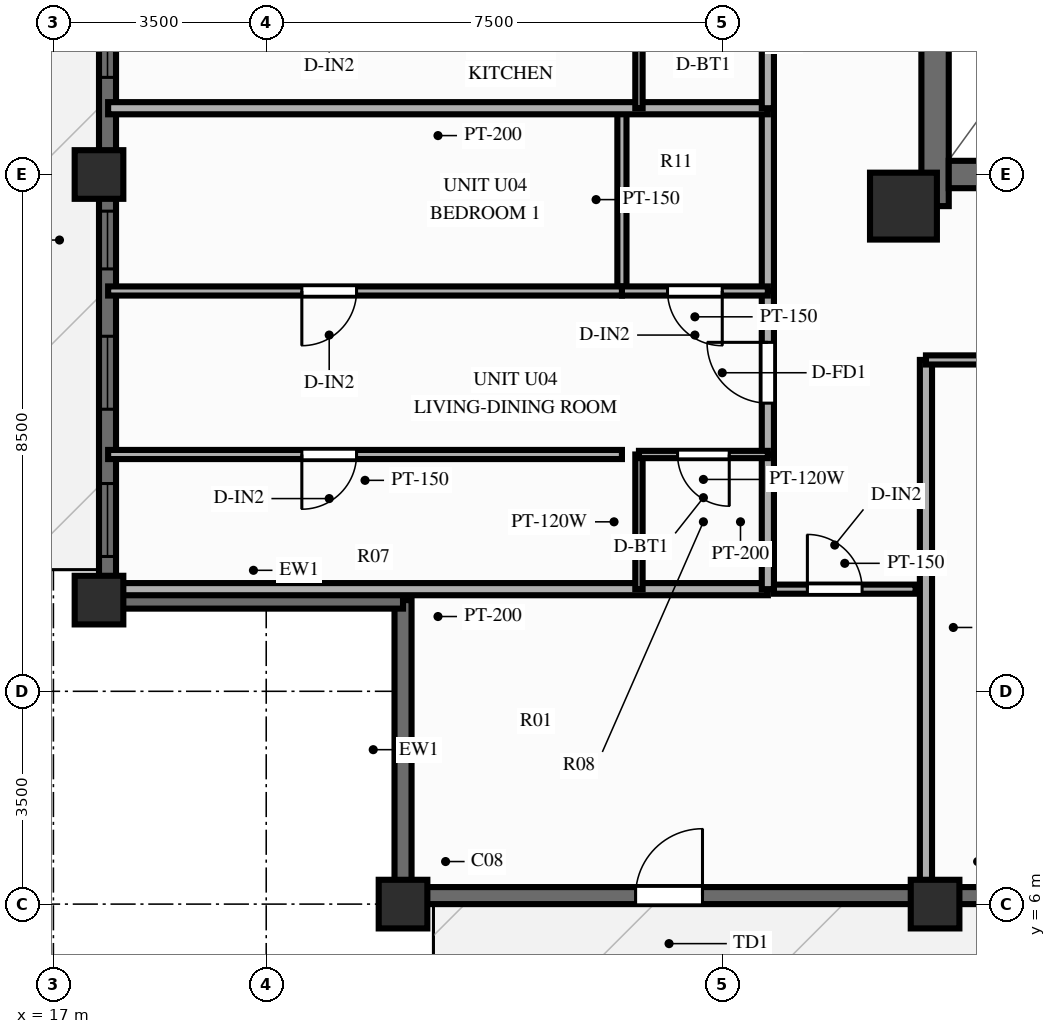
"""IFC4 building model, lengths in metres.
Left out: names, types, materials, properties, quantities, classifications, styles, units other than length and angle.
Written with IfcOpenShell. Run it as: python <this file> out.ifc"""

import sys

from ifc_helpers import new_model, si_unit, direction, frame, frame_2d, origin, origin_2d, place, context, subcontext, project, spatial, rectangle, extrude, source, transform, mapped, element, fill, save


model = new_model("IFC4")
c1 = context("Model", 3, precision=1e-05, world=origin(), true_north=direction((0.0, 1.0)))
c2 = subcontext(c1, "Body", "Model", "MODEL_VIEW")
j1 = project(units=[si_unit("LENGTHUNIT", "METRE"), si_unit("PLANEANGLEUNIT", "RADIAN")], contexts=[c1])
p1 = place(None, origin())
s1 = spatial("IfcSite", under=j1, at=p1, CompositionType="ELEMENT")
p2 = place(p1, origin())
s2 = spatial("IfcBuilding", under=s1, at=p2, CompositionType="ELEMENT")
p3 = place(p2, frame((0.0, 0.0, 192.7)))
s3 = spatial("IfcBuildingStorey", under=s2, at=p3, CompositionType="ELEMENT", Elevation=192.7)
p4 = place(p3, frame((31.5, 17.48, 0.0), z_axis=(0.0, 0.0, 1.0), x_axis=(0.0, 1.0, 0.0)))
e1 = element("IfcWall", 1, at=p4, inside=s3, PredefinedType="SHEAR", context=c2, shape_type="SweptSolid", body=[
    extrude(rectangle(XDim=19.04, YDim=0.45, at=frame_2d((9.52, 0.0))), origin(), (0.0, 0.0, 1.0), 3.9),
])
p5 = place(p4, frame((6.32, 0.0, 0.0)))
e2 = element("IfcOpeningElement", 2, at=p5, cuts=e1, PredefinedType="OPENING", context=c2, shape_type="SweptSolid", body=[
    extrude(rectangle(XDim=1.1, YDim=2.15, at=frame_2d((0.55, 1.075))), frame((0.0, 0.237, 0.0), z_axis=(0.0, -1.0, 0.0), x_axis=(1.0, 0.0, 0.0)), (0.0, 0.0, 1.0), 0.474),
])
p6 = place(p3, frame((31.725, 18.0, 0.0), z_axis=(0.0, 0.0, 1.0), x_axis=(1.0, 0.0, 0.0)))
e3 = element("IfcWall", 3, at=p6, inside=s3, PredefinedType="SHEAR", context=c2, shape_type="SweptSolid", body=[
    extrude(rectangle(XDim=12.55, YDim=0.45, at=frame_2d((6.275, 0.0))), origin(), (0.0, 0.0, 1.0), 3.9),
])
m1 = source(origin(), c2, "Body", "SweptSolid", [
    extrude(rectangle(XDim=1.1, YDim=1.1, at=origin_2d()), origin(), (0.0, 0.0, 1.0), 3.9),
])
p7 = place(p3, frame((30.98, 17.48, 0.0), z_axis=(0.0, 0.0, 1.0), x_axis=(1.0, 0.0, 0.0)))
e4 = element("IfcColumn", 4, at=p7, inside=s3, PredefinedType="COLUMN", context=c2, shape_type="MappedRepresentation", body=[
    mapped(m1, transform((0.0, 0.0, 0.0), scale=1.0)),
])
m2 = source(origin(), c2, "Body", "SweptSolid", [
    extrude(rectangle(XDim=0.8, YDim=0.8, at=origin_2d()), origin(), (0.0, 0.0, 1.0), 3.9),
])
for number, where, z_axis, x_axis in (
    (5, (22.75, 6.0, 0.0), (0.0, 0.0, 1.0), (1.0, 0.0, 0.0)),
    (6, (31.5, 6.0, 0.0), (0.0, 0.0, 1.0), (1.0, 0.0, 0.0)),
    (7, (17.75, 18.0, 0.0), (0.0, 0.0, 1.0), (1.0, 0.0, 0.0)),
    (8, (17.75, 11.0, 0.0), (0.0, 0.0, 1.0), (1.0, 0.0, 0.0)),
):
    element("IfcColumn", number, at=place(p3, frame(where, z_axis=z_axis, x_axis=x_axis)), inside=s3, PredefinedType="COLUMN", context=c2, shape_type="MappedRepresentation", body=[
        mapped(m2, transform((0.0, 0.0, 0.0), scale=1.0)),
    ])
p8 = place(p3, frame((22.75, 6.14, 0.0), z_axis=(0.0, 0.0, 1.0), x_axis=(1.0, 0.0, 0.0)))
e9 = element("IfcWall", 9, at=p8, inside=s3, PredefinedType="SOLIDWALL", context=c2, shape_type="SweptSolid", body=[
    extrude(rectangle(XDim=30.5, YDim=0.28, at=frame_2d((15.25, 0.0))), origin(), (0.0, 0.0, 1.0), 2.44),
])
p9 = place(p8, frame((4.925, 0.0, 0.0), z_axis=(0.0, 0.0, 1.0), x_axis=(-1.0, 0.0, 0.0)))
e10 = element("IfcOpeningElement", 10, at=p9, cuts=e9, PredefinedType="OPENING", context=c2, shape_type="SweptSolid", body=[
    extrude(rectangle(XDim=1.1, YDim=2.15, at=frame_2d((0.55, 1.075))), frame((0.0, 0.152, 0.0), z_axis=(0.0, -1.0, 0.0), x_axis=(1.0, 0.0, 0.0)), (0.0, 0.0, 1.0), 0.304),
])
p10 = place(p8, frame((11.387, 0.0, 0.25)))
e11 = element("IfcOpeningElement", 11, at=p10, cuts=e9, PredefinedType="OPENING", context=c2, shape_type="SweptSolid", body=[
    extrude(rectangle(XDim=1.2, YDim=1.5, at=frame_2d((0.6, 0.75))), frame((0.0, 0.152, 0.0), z_axis=(0.0, -1.0, 0.0), x_axis=(1.0, 0.0, 0.0)), (0.0, 0.0, 1.0), 0.304),
])
p11 = place(p8, frame((15.484, 0.0, 0.25)))
e12 = element("IfcOpeningElement", 12, at=p11, cuts=e9, PredefinedType="OPENING", context=c2, shape_type="SweptSolid", body=[
    extrude(rectangle(XDim=1.2, YDim=1.5, at=frame_2d((0.6, 0.75))), frame((0.0, 0.152, 0.0), z_axis=(0.0, -1.0, 0.0), x_axis=(1.0, 0.0, 0.0)), (0.0, 0.0, 1.0), 0.304),
])
p12 = place(p8, frame((17.628, 0.0, 0.25)))
e13 = element("IfcOpeningElement", 13, at=p12, cuts=e9, PredefinedType="OPENING", context=c2, shape_type="SweptSolid", body=[
    extrude(rectangle(XDim=1.2, YDim=1.5, at=frame_2d((0.6, 0.75))), frame((0.0, 0.152, 0.0), z_axis=(0.0, -1.0, 0.0), x_axis=(1.0, 0.0, 0.0)), (0.0, 0.0, 1.0), 0.304),
])
p13 = place(p8, frame((19.791, 0.0, 0.25)))
e14 = element("IfcOpeningElement", 14, at=p13, cuts=e9, PredefinedType="OPENING", context=c2, shape_type="SweptSolid", body=[
    extrude(rectangle(XDim=1.2, YDim=1.5, at=frame_2d((0.6, 0.75))), frame((0.0, 0.152, 0.0), z_axis=(0.0, -1.0, 0.0), x_axis=(1.0, 0.0, 0.0)), (0.0, 0.0, 1.0), 0.304),
])
p14 = place(p8, frame((25.525, 0.0, 0.25)))
e15 = element("IfcOpeningElement", 15, at=p14, cuts=e9, PredefinedType="OPENING", context=c2, shape_type="SweptSolid", body=[
    extrude(rectangle(XDim=1.2, YDim=1.5, at=frame_2d((0.6, 0.75))), frame((0.0, 0.152, 0.0), z_axis=(0.0, -1.0, 0.0), x_axis=(1.0, 0.0, 0.0)), (0.0, 0.0, 1.0), 0.304),
])
p15 = place(p3, frame((17.89, 11.0, 0.0), z_axis=(0.0, 0.0, 1.0), x_axis=(0.0, 1.0, 0.0)))
e16 = element("IfcWall", 16, at=p15, inside=s3, PredefinedType="SOLIDWALL", context=c2, shape_type="SweptSolid", body=[
    extrude(rectangle(XDim=32.0, YDim=0.28, at=frame_2d((16.0, 0.0))), origin(), (0.0, 0.0, 1.0), 2.44),
])
p16 = place(p15, frame((0.717, 0.0, 0.25)))
e17 = element("IfcOpeningElement", 17, at=p16, cuts=e16, PredefinedType="OPENING", context=c2, shape_type="SweptSolid", body=[
    extrude(rectangle(XDim=1.2, YDim=1.5, at=frame_2d((0.6, 0.75))), frame((0.0, 0.152, 0.0), z_axis=(0.0, -1.0, 0.0), x_axis=(1.0, 0.0, 0.0)), (0.0, 0.0, 1.0), 0.304),
])
p17 = place(p15, frame((3.139, 0.0, 0.25)))
e18 = element("IfcOpeningElement", 18, at=p17, cuts=e16, PredefinedType="OPENING", context=c2, shape_type="SweptSolid", body=[
    extrude(rectangle(XDim=1.2, YDim=1.5, at=frame_2d((0.6, 0.75))), frame((0.0, 0.152, 0.0), z_axis=(0.0, -1.0, 0.0), x_axis=(1.0, 0.0, 0.0)), (0.0, 0.0, 1.0), 0.304),
])
p18 = place(p15, frame((5.447, 0.0, 0.25)))
e19 = element("IfcOpeningElement", 19, at=p18, cuts=e16, PredefinedType="OPENING", context=c2, shape_type="SweptSolid", body=[
    extrude(rectangle(XDim=0.95, YDim=1.5, at=frame_2d((0.475, 0.75))), frame((0.0, 0.152, 0.0), z_axis=(0.0, -1.0, 0.0), x_axis=(1.0, 0.0, 0.0)), (0.0, 0.0, 1.0), 0.304),
])
p19 = place(p15, frame((8.597, 0.0, 0.25)))
e20 = element("IfcOpeningElement", 20, at=p19, cuts=e16, PredefinedType="OPENING", context=c2, shape_type="SweptSolid", body=[
    extrude(rectangle(XDim=1.2, YDim=1.5, at=frame_2d((0.6, 0.75))), frame((0.0, 0.152, 0.0), z_axis=(0.0, -1.0, 0.0), x_axis=(1.0, 0.0, 0.0)), (0.0, 0.0, 1.0), 0.304),
])
p20 = place(p15, frame((11.05, 0.0, 0.25)))
e21 = element("IfcOpeningElement", 21, at=p20, cuts=e16, PredefinedType="OPENING", context=c2, shape_type="SweptSolid", body=[
    extrude(rectangle(XDim=1.2, YDim=1.5, at=frame_2d((0.6, 0.75))), frame((0.0, 0.152, 0.0), z_axis=(0.0, -1.0, 0.0), x_axis=(1.0, 0.0, 0.0)), (0.0, 0.0, 1.0), 0.304),
])
p21 = place(p15, frame((13.697, 0.0, 0.0)))
e22 = element("IfcOpeningElement", 22, at=p21, cuts=e16, PredefinedType="OPENING", context=c2, shape_type="SweptSolid", body=[
    extrude(rectangle(XDim=1.6, YDim=2.15, at=frame_2d((0.8, 1.075))), frame((0.0, 0.152, 0.0), z_axis=(0.0, -1.0, 0.0), x_axis=(1.0, 0.0, 0.0)), (0.0, 0.0, 1.0), 0.304),
])
p22 = place(p15, frame((16.507, 0.0, 0.25)))
e23 = element("IfcOpeningElement", 23, at=p22, cuts=e16, PredefinedType="OPENING", context=c2, shape_type="SweptSolid", body=[
    extrude(rectangle(XDim=1.2, YDim=1.5, at=frame_2d((0.6, 0.75))), frame((0.0, 0.152, 0.0), z_axis=(0.0, -1.0, 0.0), x_axis=(1.0, 0.0, 0.0)), (0.0, 0.0, 1.0), 0.304),
])
p23 = place(p15, frame((18.959, 0.0, 0.25)))
e24 = element("IfcOpeningElement", 24, at=p23, cuts=e16, PredefinedType="OPENING", context=c2, shape_type="SweptSolid", body=[
    extrude(rectangle(XDim=1.2, YDim=1.5, at=frame_2d((0.6, 0.75))), frame((0.0, 0.152, 0.0), z_axis=(0.0, -1.0, 0.0), x_axis=(1.0, 0.0, 0.0)), (0.0, 0.0, 1.0), 0.304),
])
p24 = place(p15, frame((21.807, 0.0, 0.25)))
e25 = element("IfcOpeningElement", 25, at=p24, cuts=e16, PredefinedType="OPENING", context=c2, shape_type="SweptSolid", body=[
    extrude(rectangle(XDim=1.2, YDim=1.5, at=frame_2d((0.6, 0.75))), frame((0.0, 0.152, 0.0), z_axis=(0.0, -1.0, 0.0), x_axis=(1.0, 0.0, 0.0)), (0.0, 0.0, 1.0), 0.304),
])
p25 = place(p15, frame((26.967, 0.0, 0.25)))
e26 = element("IfcOpeningElement", 26, at=p25, cuts=e16, PredefinedType="OPENING", context=c2, shape_type="SweptSolid", body=[
    extrude(rectangle(XDim=1.2, YDim=1.5, at=frame_2d((0.6, 0.75))), frame((0.0, 0.152, 0.0), z_axis=(0.0, -1.0, 0.0), x_axis=(1.0, 0.0, 0.0)), (0.0, 0.0, 1.0), 0.304),
])
p26 = place(p15, frame((29.687, 0.0, 0.25)))
e27 = element("IfcOpeningElement", 27, at=p26, cuts=e16, PredefinedType="OPENING", context=c2, shape_type="SweptSolid", body=[
    extrude(rectangle(XDim=1.2, YDim=1.5, at=frame_2d((0.6, 0.75))), frame((0.0, 0.152, 0.0), z_axis=(0.0, -1.0, 0.0), x_axis=(1.0, 0.0, 0.0)), (0.0, 0.0, 1.0), 0.304),
])
for number, where, z_axis, x_axis in (
    (28, (22.75, 6.08, 0.0), (0.0, 0.0, 1.0), (0.0, 1.0, 0.0)),
    (29, (17.83, 11.0, 0.0), (0.0, 0.0, 1.0), (1.0, 0.0, 0.0)),
):
    element("IfcWall", number, at=place(p3, frame(where, z_axis=z_axis, x_axis=x_axis)), inside=s3, PredefinedType="SOLIDWALL", context=c2, shape_type="SweptSolid", body=[
        extrude(rectangle(XDim=4.92, YDim=0.28, at=frame_2d((2.46, 0.0))), origin(), (0.0, 0.0, 1.0), 2.44),
    ])
p27 = place(p3, frame((28.85, 11.18, 0.0), z_axis=(0.0, 0.0, 1.0), x_axis=(1.0, 0.0, 0.0)))
e30 = element("IfcWall", 30, at=p27, inside=s3, PredefinedType="PARTITIONING", context=c2, shape_type="SweptSolid", body=[
    extrude(rectangle(XDim=2.33, YDim=0.15, at=frame_2d((1.165, 0.0))), origin(), (0.0, 0.0, 1.0), 2.24),
])
p28 = place(p27, frame((0.55, 0.0, 0.0)))
e31 = element("IfcOpeningElement", 31, at=p28, cuts=e30, PredefinedType="OPENING", context=c2, shape_type="SweptSolid", body=[
    extrude(rectangle(XDim=0.9, YDim=2.1, at=frame_2d((0.45, 1.05))), frame((0.0, 0.087, 0.0), z_axis=(0.0, -1.0, 0.0), x_axis=(1.0, 0.0, 0.0)), (0.0, 0.0, 1.0), 0.174),
])
p29 = place(p3, frame((31.35, 14.95, 0.0), z_axis=(0.0, 0.0, 1.0), x_axis=(0.0, -1.0, 0.0)))
e32 = element("IfcWall", 32, at=p29, inside=s3, PredefinedType="PARTITIONING", context=c2, shape_type="SweptSolid", body=[
    extrude(rectangle(XDim=8.8, YDim=0.2, at=frame_2d((4.4, 0.0))), origin(), (0.0, 0.0, 1.0), 2.44),
])
p30 = place(p3, frame((31.35, 14.95, 0.0), z_axis=(0.0, 0.0, 1.0), x_axis=(1.0, 0.0, 0.0)))
e33 = element("IfcWall", 33, at=p30, inside=s3, PredefinedType="PARTITIONING", context=c2, shape_type="SweptSolid", body=[
    extrude(rectangle(XDim=6.384, YDim=0.15, at=frame_2d((3.192, 0.0))), origin(), (0.0, 0.0, 1.0), 3.56),
])
p31 = place(p30, frame((2.642, 0.0, 0.0)))
e34 = element("IfcOpeningElement", 34, at=p31, cuts=e33, PredefinedType="OPENING", context=c2, shape_type="SweptSolid", body=[
    extrude(rectangle(XDim=1.1, YDim=2.15, at=frame_2d((0.55, 1.075))), frame((0.0, 0.087, 0.0), z_axis=(0.0, -1.0, 0.0), x_axis=(1.0, 0.0, 0.0)), (0.0, 0.0, 1.0), 0.174),
])
p32 = place(p3, frame((28.75, 11.18, 0.0), z_axis=(0.0, 0.0, 1.0), x_axis=(-1.0, 0.0, 0.0)))
e35 = element("IfcWall", 35, at=p32, inside=s3, PredefinedType="PARTITIONING", context=c2, shape_type="SweptSolid", body=[
    extrude(rectangle(XDim=10.85, YDim=0.2, at=frame_2d((5.425, 0.0))), origin(), (0.0, 0.0, 1.0), 2.24),
])
p33 = place(p3, frame((28.75, 11.18, 0.0), z_axis=(0.0, 0.0, 1.0), x_axis=(0.0, 1.0, 0.0)))
e36 = element("IfcWall", 36, at=p33, inside=s3, PredefinedType="PARTITIONING", context=c2, shape_type="SweptSolid", body=[
    extrude(rectangle(XDim=2.215, YDim=0.2, at=frame_2d((1.107, 0.0))), origin(), (0.0, 0.0, 1.0), 3.56),
])
p34 = place(p3, frame((28.75, 13.395, 0.0), z_axis=(0.0, 0.0, 1.0), x_axis=(0.0, 1.0, 0.0)))
e37 = element("IfcWall", 37, at=p34, inside=s3, PredefinedType="PARTITIONING", context=c2, shape_type="SweptSolid", body=[
    extrude(rectangle(XDim=2.689, YDim=0.2, at=frame_2d((1.345, 0.0))), origin(), (0.0, 0.0, 1.0), 3.56),
])
p35 = place(p34, frame((0.845, 0.0, 0.0)))
e38 = element("IfcOpeningElement", 38, at=p35, cuts=e37, PredefinedType="OPENING", context=c2, shape_type="SweptSolid", body=[
    extrude(rectangle(XDim=1.0, YDim=2.15, at=frame_2d((0.5, 1.075))), frame((0.0, 0.112, 0.0), z_axis=(0.0, -1.0, 0.0), x_axis=(1.0, 0.0, 0.0)), (0.0, 0.0, 1.0), 0.224),
])
p36 = place(p3, frame((28.75, 16.084, 0.0), z_axis=(0.0, 0.0, 1.0), x_axis=(0.0, 1.0, 0.0)))
e39 = element("IfcWall", 39, at=p36, inside=s3, PredefinedType="PARTITIONING", context=c2, shape_type="SweptSolid", body=[
    extrude(rectangle(XDim=3.006, YDim=0.2, at=frame_2d((1.503, 0.0))), origin(), (0.0, 0.0, 1.0), 3.56),
])
p37 = place(p3, frame((26.63, 11.18, 0.0), z_axis=(0.0, 0.0, 1.0), x_axis=(0.0, 1.0, 0.0)))
e40 = element("IfcWall", 40, at=p37, inside=s3, PredefinedType="PARTITIONING", context=c2, shape_type="SweptSolid", body=[
    extrude(rectangle(XDim=2.215, YDim=0.12, at=frame_2d((1.107, 0.0))), origin(), (0.0, 0.0, 1.0), 3.56),
])
p38 = place(p3, frame((26.35, 16.084, 0.0), z_axis=(0.0, 0.0, 1.0), x_axis=(0.0, 1.0, 0.0)))
e41 = element("IfcWall", 41, at=p38, inside=s3, PredefinedType="PARTITIONING", context=c2, shape_type="SweptSolid", body=[
    extrude(rectangle(XDim=3.006, YDim=0.15, at=frame_2d((1.503, 0.0))), origin(), (0.0, 0.0, 1.0), 3.56),
])
p39 = place(p3, frame((28.75, 13.395, 0.0), z_axis=(0.0, 0.0, 1.0), x_axis=(-1.0, 0.0, 0.0)))
e42 = element("IfcWall", 42, at=p39, inside=s3, PredefinedType="PARTITIONING", context=c2, shape_type="SweptSolid", body=[
    extrude(rectangle(XDim=2.12, YDim=0.12, at=frame_2d((1.06, 0.0))), origin(), (0.0, 0.0, 1.0), 3.56),
])
p40 = place(p39, frame((0.635, 0.0, 0.0)))
e43 = element("IfcOpeningElement", 43, at=p40, cuts=e42, PredefinedType="OPENING", context=c2, shape_type="SweptSolid", body=[
    extrude(rectangle(XDim=0.85, YDim=2.05, at=frame_2d((0.425, 1.025))), frame((0.0, 0.072, 0.0), z_axis=(0.0, -1.0, 0.0), x_axis=(1.0, 0.0, 0.0)), (0.0, 0.0, 1.0), 0.144),
])
p41 = place(p3, frame((26.35, 13.395, 0.0), z_axis=(0.0, 0.0, 1.0), x_axis=(-1.0, 0.0, 0.0)))
e44 = element("IfcWall", 44, at=p41, inside=s3, PredefinedType="PARTITIONING", context=c2, shape_type="SweptSolid", body=[
    extrude(rectangle(XDim=8.45, YDim=0.15, at=frame_2d((4.225, 0.0))), origin(), (0.0, 0.0, 1.0), 3.56),
])
p42 = place(p41, frame((4.364, 0.0, 0.0)))
e45 = element("IfcOpeningElement", 45, at=p42, cuts=e44, PredefinedType="OPENING", context=c2, shape_type="SweptSolid", body=[
    extrude(rectangle(XDim=0.9, YDim=2.1, at=frame_2d((0.45, 1.05))), frame((0.0, 0.087, 0.0), z_axis=(0.0, -1.0, 0.0), x_axis=(1.0, 0.0, 0.0)), (0.0, 0.0, 1.0), 0.174),
])
p43 = place(p3, frame((28.75, 16.084, 0.0), z_axis=(0.0, 0.0, 1.0), x_axis=(-1.0, 0.0, 0.0)))
e46 = element("IfcWall", 46, at=p43, inside=s3, PredefinedType="PARTITIONING", context=c2, shape_type="SweptSolid", body=[
    extrude(rectangle(XDim=2.4, YDim=0.15, at=frame_2d((1.2, 0.0))), origin(), (0.0, 0.0, 1.0), 3.56),
])
p44 = place(p43, frame((0.75, 0.0, 0.0)))
e47 = element("IfcOpeningElement", 47, at=p44, cuts=e46, PredefinedType="OPENING", context=c2, shape_type="SweptSolid", body=[
    extrude(rectangle(XDim=0.9, YDim=2.1, at=frame_2d((0.45, 1.05))), frame((0.0, 0.087, 0.0), z_axis=(0.0, -1.0, 0.0), x_axis=(1.0, 0.0, 0.0)), (0.0, 0.0, 1.0), 0.174),
])
p45 = place(p3, frame((26.35, 16.084, 0.0), z_axis=(0.0, 0.0, 1.0), x_axis=(-1.0, 0.0, 0.0)))
e48 = element("IfcWall", 48, at=p45, inside=s3, PredefinedType="PARTITIONING", context=c2, shape_type="SweptSolid", body=[
    extrude(rectangle(XDim=8.45, YDim=0.15, at=frame_2d((4.225, 0.0))), origin(), (0.0, 0.0, 1.0), 3.56),
])
p46 = place(p45, frame((4.364, 0.0, 0.0)))
e49 = element("IfcOpeningElement", 49, at=p46, cuts=e48, PredefinedType="OPENING", context=c2, shape_type="SweptSolid", body=[
    extrude(rectangle(XDim=0.9, YDim=2.1, at=frame_2d((0.45, 1.05))), frame((0.0, 0.087, 0.0), z_axis=(0.0, -1.0, 0.0), x_axis=(1.0, 0.0, 0.0)), (0.0, 0.0, 1.0), 0.174),
])
p47 = place(p3, frame((28.75, 19.09, 0.0), z_axis=(0.0, 0.0, 1.0), x_axis=(-1.0, 0.0, 0.0)))
e50 = element("IfcWall", 50, at=p47, inside=s3, PredefinedType="PARTITIONING", context=c2, shape_type="SweptSolid", body=[
    extrude(rectangle(XDim=10.85, YDim=0.2, at=frame_2d((5.425, 0.0))), origin(), (0.0, 0.0, 1.0), 3.56),
])
p48 = place(p3, frame((28.75, 19.09, 0.0), z_axis=(0.0, 0.0, 1.0), x_axis=(0.0, 1.0, 0.0)))
e51 = element("IfcWall", 51, at=p48, inside=s3, PredefinedType="PARTITIONING", context=c2, shape_type="SweptSolid", body=[
    extrude(rectangle(XDim=2.215, YDim=0.2, at=frame_2d((1.107, 0.0))), origin(), (0.0, 0.0, 1.0), 3.56),
])
p49 = place(p3, frame((26.63, 19.09, 0.0), z_axis=(0.0, 0.0, 1.0), x_axis=(0.0, 1.0, 0.0)))
e52 = element("IfcWall", 52, at=p49, inside=s3, PredefinedType="PARTITIONING", context=c2, shape_type="SweptSolid", body=[
    extrude(rectangle(XDim=2.215, YDim=0.12, at=frame_2d((1.107, 0.0))), origin(), (0.0, 0.0, 1.0), 3.56),
])
m3 = source(origin(), c2, "Body", "SweptSolid", [
    extrude(rectangle(XDim=1.1, YDim=2.15, at=frame_2d((0.55, 1.075))), frame((0.0, 0.025, 0.0), z_axis=(0.0, -1.0, 0.0), x_axis=(1.0, 0.0, 0.0)), (0.0, 0.0, 1.0), 0.05),
])
p50 = place(p9, origin())
e53 = element("IfcDoor", 53, at=p50, inside=s3, OperationType="SINGLE_SWING_LEFT", PredefinedType="DOOR", context=c2, shape_type="MappedRepresentation", body=[
    mapped(m3, transform((0.0, 0.0, 0.0), scale=1.0)),
])
fill(e10, e53)
m4 = source(origin(), c2, "Body", "SweptSolid", [
    extrude(rectangle(XDim=1.2, YDim=1.5, at=frame_2d((0.6, 0.75))), frame((0.0, 0.03, 0.0), z_axis=(0.0, -1.0, 0.0), x_axis=(1.0, 0.0, 0.0)), (0.0, 0.0, 1.0), 0.06),
])
p51 = place(p16, origin())
e54 = element("IfcWindow", 54, at=p51, inside=s3, PartitioningType="SINGLE_PANEL", PredefinedType="WINDOW", context=c2, shape_type="MappedRepresentation", body=[
    mapped(m4, transform((0.0, 0.0, 0.0), scale=1.0)),
])
fill(e17, e54)
p52 = place(p17, origin())
e55 = element("IfcWindow", 55, at=p52, inside=s3, PartitioningType="SINGLE_PANEL", PredefinedType="WINDOW", context=c2, shape_type="MappedRepresentation", body=[
    mapped(m4, transform((0.0, 0.0, 0.0), scale=1.0)),
])
fill(e18, e55)
m5 = source(origin(), c2, "Body", "SweptSolid", [
    extrude(rectangle(XDim=0.95, YDim=1.5, at=frame_2d((0.475, 0.75))), frame((0.0, 0.03, 0.0), z_axis=(0.0, -1.0, 0.0), x_axis=(1.0, 0.0, 0.0)), (0.0, 0.0, 1.0), 0.06),
])
p53 = place(p18, origin())
e56 = element("IfcWindow", 56, at=p53, inside=s3, PartitioningType="SINGLE_PANEL", PredefinedType="WINDOW", context=c2, shape_type="MappedRepresentation", body=[
    mapped(m5, transform((0.0, 0.0, 0.0), scale=1.0)),
])
fill(e19, e56)
p54 = place(p19, origin())
e57 = element("IfcWindow", 57, at=p54, inside=s3, PartitioningType="SINGLE_PANEL", PredefinedType="WINDOW", context=c2, shape_type="MappedRepresentation", body=[
    mapped(m4, transform((0.0, 0.0, 0.0), scale=1.0)),
])
fill(e20, e57)
m6 = source(origin(), c2, "Body", "SweptSolid", [
    extrude(rectangle(XDim=0.9, YDim=2.1, at=frame_2d((0.45, 1.05))), frame((0.0, 0.025, 0.0), z_axis=(0.0, -1.0, 0.0), x_axis=(1.0, 0.0, 0.0)), (0.0, 0.0, 1.0), 0.05),
])
p55 = place(p28, origin())
e58 = element("IfcDoor", 58, at=p55, inside=s3, OperationType="SINGLE_SWING_LEFT", PredefinedType="DOOR", context=c2, shape_type="MappedRepresentation", body=[
    mapped(m6, transform((0.0, 0.0, 0.0), scale=1.0)),
])
fill(e31, e58)
m7 = source(origin(), c2, "Body", "SweptSolid", [
    extrude(rectangle(XDim=1.0, YDim=2.15, at=frame_2d((0.5, 1.075))), frame((0.0, 0.025, 0.0), z_axis=(0.0, -1.0, 0.0), x_axis=(1.0, 0.0, 0.0)), (0.0, 0.0, 1.0), 0.05),
])
p56 = place(p35, origin())
e59 = element("IfcDoor", 59, at=p56, inside=s3, OperationType="SINGLE_SWING_RIGHT", PredefinedType="DOOR", context=c2, shape_type="MappedRepresentation", body=[
    mapped(m7, transform((0.0, 0.0, 0.0), scale=1.0)),
])
fill(e38, e59)
m8 = source(origin(), c2, "Body", "SweptSolid", [
    extrude(rectangle(XDim=0.85, YDim=2.05, at=frame_2d((0.425, 1.025))), frame((0.0, 0.025, 0.0), z_axis=(0.0, -1.0, 0.0), x_axis=(1.0, 0.0, 0.0)), (0.0, 0.0, 1.0), 0.05),
])
p57 = place(p40, origin())
e60 = element("IfcDoor", 60, at=p57, inside=s3, OperationType="SINGLE_SWING_LEFT", PredefinedType="DOOR", context=c2, shape_type="MappedRepresentation", body=[
    mapped(m8, transform((0.0, 0.0, 0.0), scale=1.0)),
])
fill(e43, e60)
p58 = place(p42, origin())
e61 = element("IfcDoor", 61, at=p58, inside=s3, OperationType="SINGLE_SWING_RIGHT", PredefinedType="DOOR", context=c2, shape_type="MappedRepresentation", body=[
    mapped(m6, transform((0.0, 0.0, 0.0), scale=1.0)),
])
fill(e45, e61)
p59 = place(p44, origin())
e62 = element("IfcDoor", 62, at=p59, inside=s3, OperationType="SINGLE_SWING_LEFT", PredefinedType="DOOR", context=c2, shape_type="MappedRepresentation", body=[
    mapped(m6, transform((0.0, 0.0, 0.0), scale=1.0)),
])
fill(e47, e62)
p60 = place(p46, origin())
e63 = element("IfcDoor", 63, at=p60, inside=s3, OperationType="SINGLE_SWING_RIGHT", PredefinedType="DOOR", context=c2, shape_type="MappedRepresentation", body=[
    mapped(m6, transform((0.0, 0.0, 0.0), scale=1.0)),
])
fill(e49, e63)
save(model, sys.argv[1])
